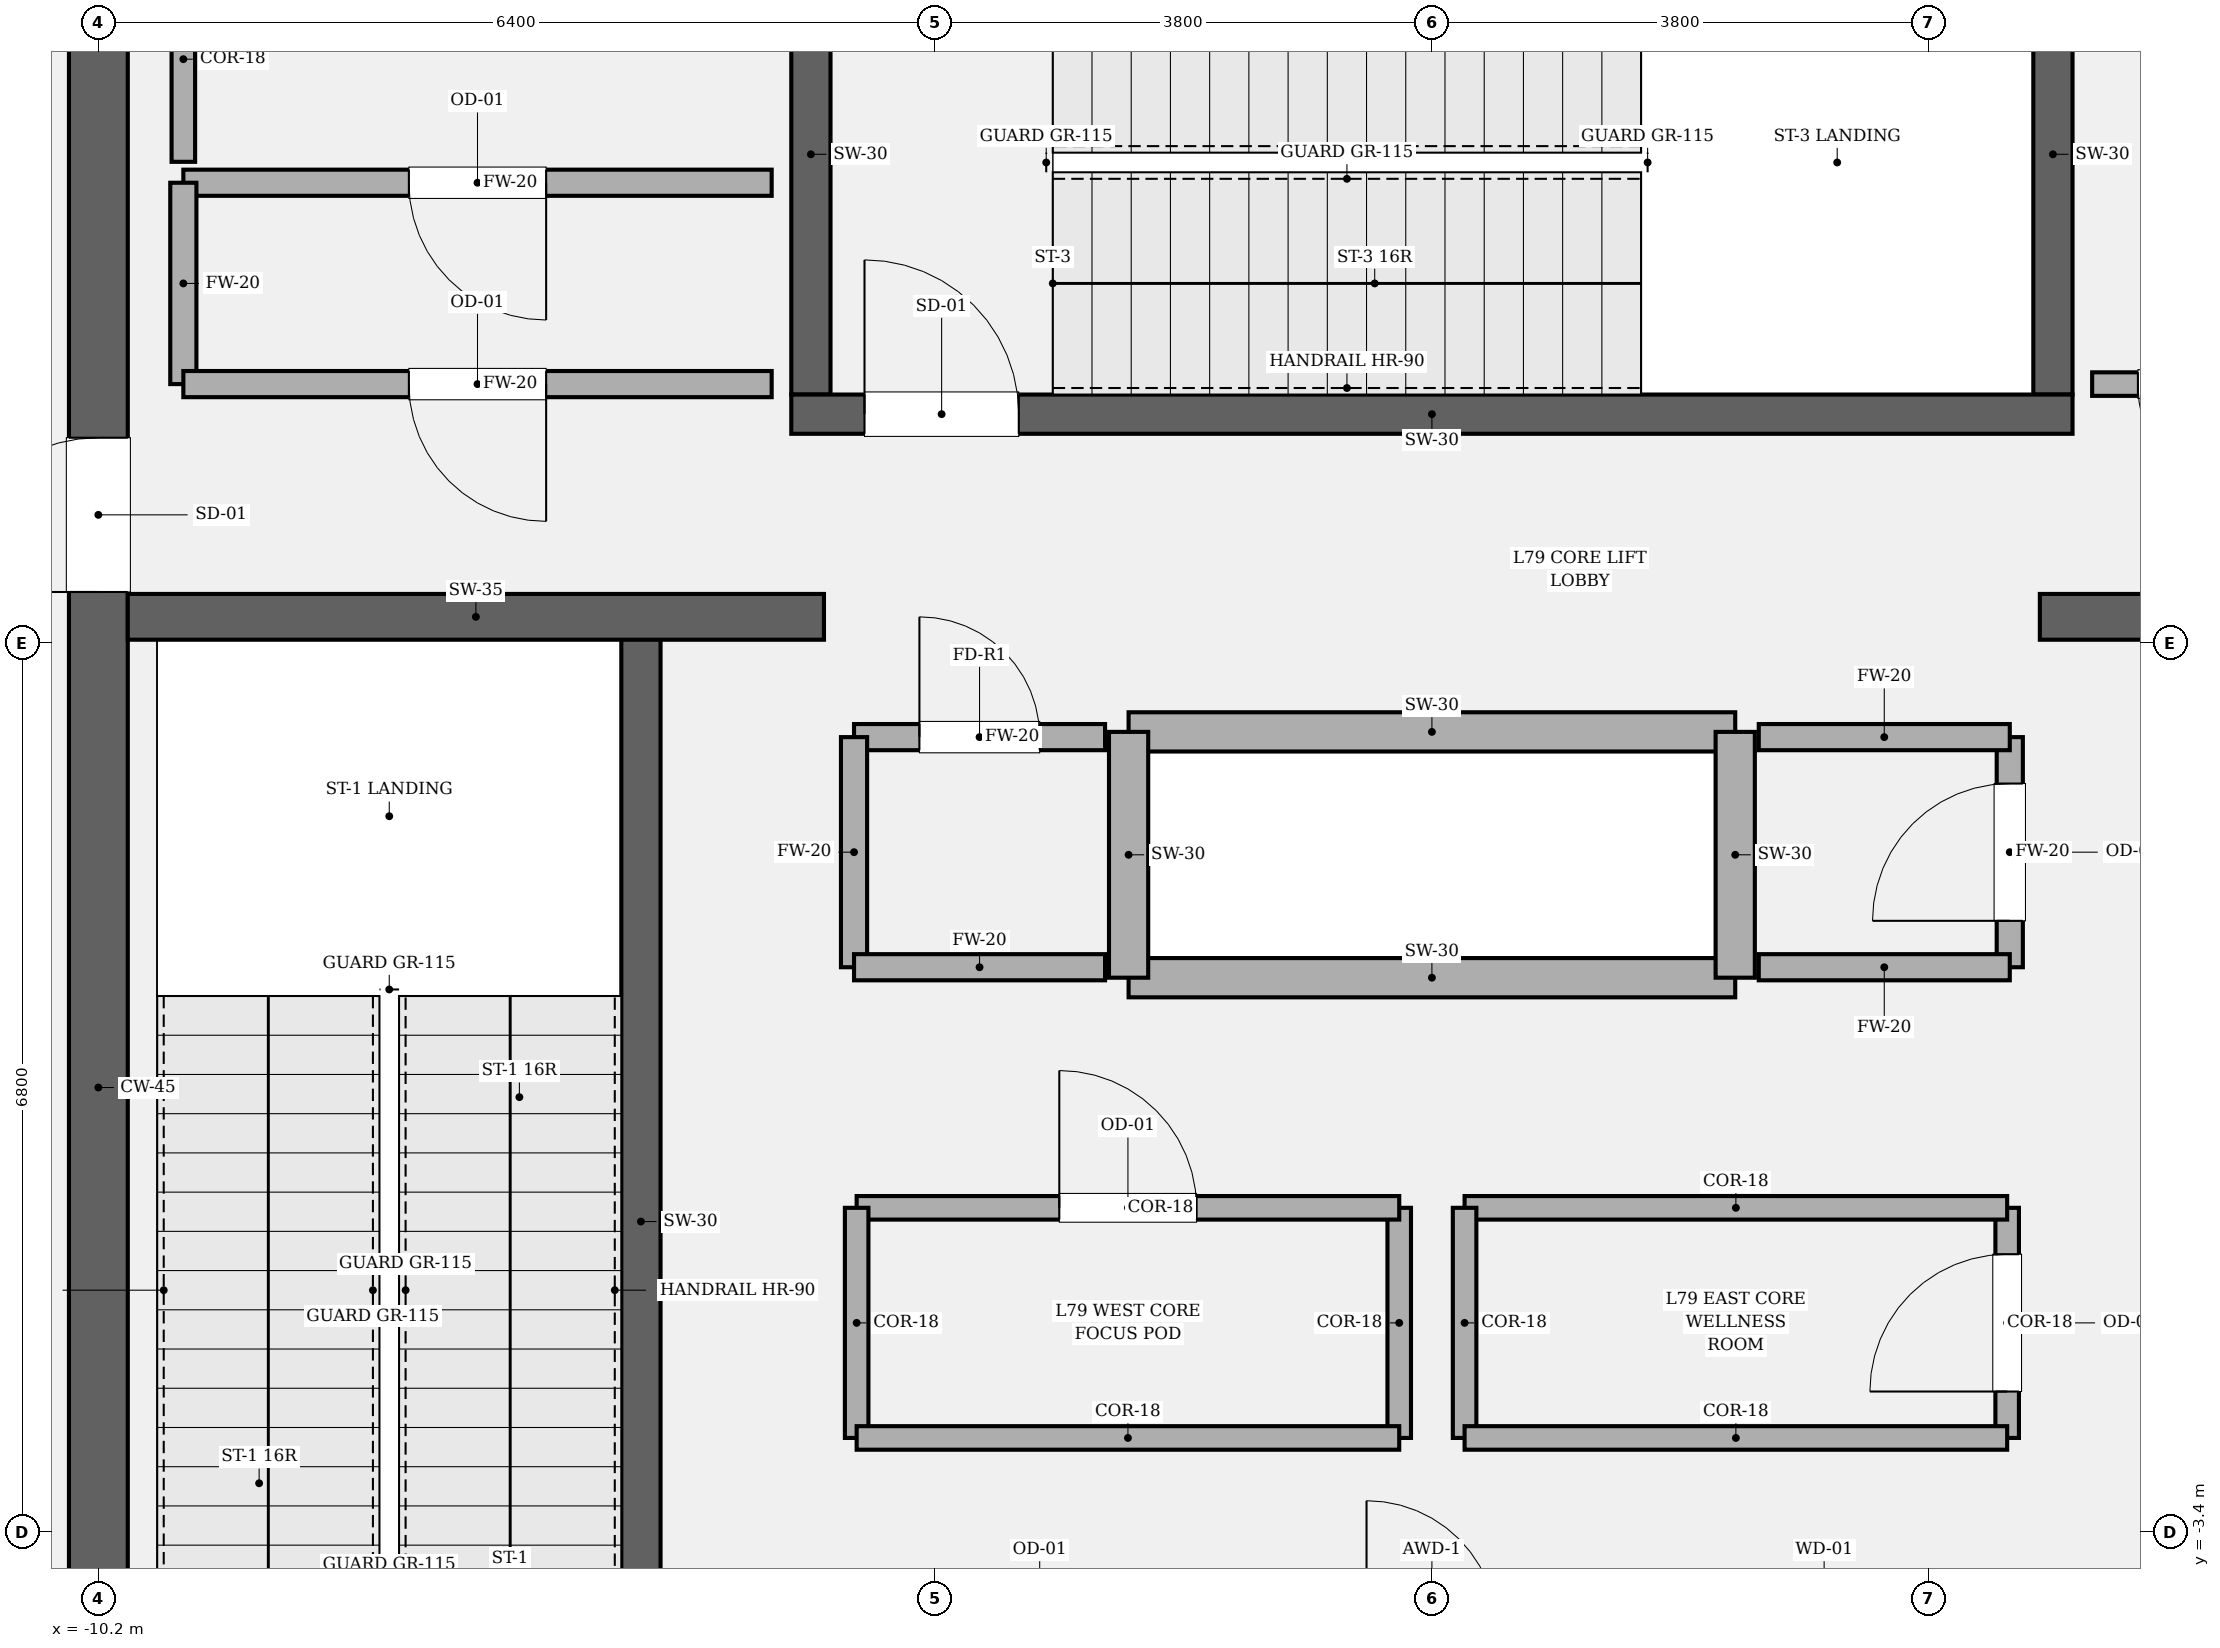
"""IFC4 building model, lengths in metres.
Left out: names, types, materials, properties, quantities, classifications, styles, units other than length and angle.
Written with IfcOpenShell. Run it as: python <this file> out.ifc"""

import sys

from ifc_helpers import new_model, si_unit, direction, frame, frame_2d, origin, place, context, subcontext, project, spatial, rectangle, extrude, element, fill, save


model = new_model("IFC4")
c1 = context("Model", 3, precision=1e-05, world=origin(), true_north=direction((0.0, 1.0)))
c2 = subcontext(c1, "Body", "Model", "MODEL_VIEW")
j1 = project(units=[si_unit("LENGTHUNIT", "METRE"), si_unit("PLANEANGLEUNIT", "RADIAN")], contexts=[c1])
p1 = place(None, origin())
s1 = spatial("IfcSite", under=j1, at=p1, CompositionType="ELEMENT")
p2 = place(p1, origin())
s2 = spatial("IfcBuilding", under=s1, at=p2, CompositionType="ELEMENT")
p3 = place(p2, frame((0.0, 0.0, 334.2)))
s3 = spatial("IfcBuildingStorey", under=s2, at=p3, CompositionType="ELEMENT", Elevation=334.2)
p4 = place(p3, frame((-10.2, -8.975, 0.0), z_axis=(0.0, 0.0, 1.0), x_axis=(0.0, 1.0, 0.0)))
e1 = element("IfcWall", 1, at=p4, inside=s3, PredefinedType="SHEAR", context=c2, shape_type="SweptSolid", body=[
    extrude(rectangle(XDim=17.95, YDim=0.45, at=frame_2d((8.975, 0.0))), origin(), (0.0, 0.0, 1.0), 4.8),
])
p5 = place(p4, frame((12.765, 0.0, 0.0)))
e2 = element("IfcOpeningElement", 2, at=p5, cuts=e1, PredefinedType="OPENING", context=c2, shape_type="SweptSolid", body=[
    extrude(rectangle(XDim=1.18, YDim=2.2, at=frame_2d((0.59, 1.1))), frame((0.0, 0.235, 0.0), z_axis=(0.0, -1.0, 0.0), x_axis=(1.0, 0.0, 0.0)), (0.0, 0.0, 1.0), 0.47),
])
p6 = place(p3, frame((-6.05, -5.5, 0.0), z_axis=(0.0, 0.0, 1.0), x_axis=(0.0, 1.0, 0.0)))
e3 = element("IfcWall", 3, at=p6, inside=s3, PredefinedType="SOLIDWALL", context=c2, shape_type="SweptSolid", body=[
    extrude(rectangle(XDim=8.95, YDim=0.3, at=frame_2d((4.475, 0.0))), origin(), (0.0, 0.0, 1.0), 4.8),
])
for number, where, z_axis, x_axis in (
    (4, (-4.75, 5.3, 0.0), (0.0, 0.0, 1.0), (0.0, 1.0, 0.0)),
    (5, (4.75, 8.975, 0.0), (0.0, 0.0, 1.0), (0.0, -1.0, 0.0)),
):
    element("IfcWall", number, at=place(p3, frame(where, z_axis=z_axis, x_axis=x_axis)), inside=s3, PredefinedType="SOLIDWALL", context=c2, shape_type="SweptSolid", body=[
        extrude(rectangle(XDim=3.675, YDim=0.3, at=frame_2d((1.837, 0.0))), origin(), (0.0, 0.0, 1.0), 4.8),
    ])
p7 = place(p3, frame((-4.9, 5.15, 0.0), z_axis=(0.0, 0.0, 1.0), x_axis=(1.0, 0.0, 0.0)))
e6 = element("IfcWall", 6, at=p7, inside=s3, PredefinedType="SOLIDWALL", context=c2, shape_type="SweptSolid", body=[
    extrude(rectangle(XDim=9.8, YDim=0.3, at=frame_2d((4.9, 0.0))), origin(), (0.0, 0.0, 1.0), 4.8),
])
p8 = place(p7, frame((0.56, 0.0, 0.0)))
e7 = element("IfcOpeningElement", 7, at=p8, cuts=e6, PredefinedType="OPENING", context=c2, shape_type="SweptSolid", body=[
    extrude(rectangle(XDim=1.18, YDim=2.2, at=frame_2d((0.59, 1.1))), frame((0.0, 0.16, 0.0), z_axis=(0.0, -1.0, 0.0), x_axis=(1.0, 0.0, 0.0)), (0.0, 0.0, 1.0), 0.32),
])
for number, where, z_axis, x_axis in (
    (8, (-9.975, 3.6, 0.0), (0.0, 0.0, 1.0), (1.0, 0.0, 0.0)),
    (9, (4.65, 3.6, 0.0), (0.0, 0.0, 1.0), (1.0, 0.0, 0.0)),
):
    element("IfcWall", number, at=place(p3, frame(where, z_axis=z_axis, x_axis=x_axis)), inside=s3, PredefinedType="SOLIDWALL", context=c2, shape_type="SweptSolid", body=[
        extrude(rectangle(XDim=5.325, YDim=0.35, at=frame_2d((2.663, 0.0))), origin(), (0.0, 0.0, 1.0), 4.8),
    ])
for number, where, z_axis, x_axis in (
    (10, (-2.32, 0.84, 0.0), (0.0, 0.0, 1.0), (1.0, 0.0, 0.0)),
    (11, (-2.32, 2.72, 0.0), (0.0, 0.0, 1.0), (1.0, 0.0, 0.0)),
):
    element("IfcWall", number, at=place(p3, frame(where, z_axis=z_axis, x_axis=x_axis)), inside=s3, PredefinedType="SOLIDWALL", context=c2, shape_type="SweptSolid", body=[
        extrude(rectangle(XDim=4.64, YDim=0.3, at=frame_2d((2.32, 0.0))), origin(), (0.0, 0.0, 1.0), 4.54),
    ])
for number, where, z_axis, x_axis in (
    (12, (-2.32, 0.84, 0.0), (0.0, 0.0, 1.0), (0.0, 1.0, 0.0)),
    (13, (2.32, 0.84, 0.0), (0.0, 0.0, 1.0), (0.0, 1.0, 0.0)),
):
    element("IfcWall", number, at=place(p3, frame(where, z_axis=z_axis, x_axis=x_axis)), inside=s3, PredefinedType="SOLIDWALL", context=c2, shape_type="SweptSolid", body=[
        extrude(rectangle(XDim=1.88, YDim=0.3, at=frame_2d((0.94, 0.0))), origin(), (0.0, 0.0, 1.0), 4.54),
    ])
p9 = place(p3, frame((-0.25, -2.68, 0.0), z_axis=(0.0, 0.0, 1.0), x_axis=(0.0, 1.0, 0.0)))
e14 = element("IfcWall", 14, at=p9, inside=s3, PredefinedType="PARTITIONING", context=c2, shape_type="SweptSolid", body=[
    extrude(rectangle(XDim=1.76, YDim=0.18, at=frame_2d((0.88, 0.0))), origin(), (0.0, 0.0, 1.0), 4.54),
])
p10 = place(p3, frame((-0.25, -0.92, 0.0), z_axis=(0.0, 0.0, 1.0), x_axis=(-1.0, 0.0, 0.0)))
e15 = element("IfcWall", 15, at=p10, inside=s3, PredefinedType="PARTITIONING", context=c2, shape_type="SweptSolid", body=[
    extrude(rectangle(XDim=4.15, YDim=0.18, at=frame_2d((2.075, 0.0))), origin(), (0.0, 0.0, 1.0), 4.54),
])
p11 = place(p10, frame((1.55, 0.0, 0.0)))
e16 = element("IfcOpeningElement", 16, at=p11, cuts=e15, PredefinedType="OPENING", context=c2, shape_type="SweptSolid", body=[
    extrude(rectangle(XDim=1.05, YDim=2.2, at=frame_2d((0.525, 1.1))), frame((0.0, 0.1, 0.0), z_axis=(0.0, -1.0, 0.0), x_axis=(1.0, 0.0, 0.0)), (0.0, 0.0, 1.0), 0.2),
])
p12 = place(p3, frame((-4.4, -0.92, 0.0), z_axis=(0.0, 0.0, 1.0), x_axis=(0.0, -1.0, 0.0)))
e17 = element("IfcWall", 17, at=p12, inside=s3, PredefinedType="PARTITIONING", context=c2, shape_type="SweptSolid", body=[
    extrude(rectangle(XDim=1.76, YDim=0.18, at=frame_2d((0.88, 0.0))), origin(), (0.0, 0.0, 1.0), 4.54),
])
p13 = place(p3, frame((-4.4, -2.68, 0.0), z_axis=(0.0, 0.0, 1.0), x_axis=(1.0, 0.0, 0.0)))
e18 = element("IfcWall", 18, at=p13, inside=s3, PredefinedType="PARTITIONING", context=c2, shape_type="SweptSolid", body=[
    extrude(rectangle(XDim=4.15, YDim=0.18, at=frame_2d((2.075, 0.0))), origin(), (0.0, 0.0, 1.0), 4.54),
])
p14 = place(p3, frame((4.4, -2.68, 0.0), z_axis=(0.0, 0.0, 1.0), x_axis=(0.0, 1.0, 0.0)))
e19 = element("IfcWall", 19, at=p14, inside=s3, PredefinedType="PARTITIONING", context=c2, shape_type="SweptSolid", body=[
    extrude(rectangle(XDim=1.76, YDim=0.18, at=frame_2d((0.88, 0.0))), origin(), (0.0, 0.0, 1.0), 4.54),
])
p15 = place(p14, frame((0.355, 0.0, 0.0)))
e20 = element("IfcOpeningElement", 20, at=p15, cuts=e19, PredefinedType="OPENING", context=c2, shape_type="SweptSolid", body=[
    extrude(rectangle(XDim=1.05, YDim=2.2, at=frame_2d((0.525, 1.1))), frame((0.0, 0.1, 0.0), z_axis=(0.0, -1.0, 0.0), x_axis=(1.0, 0.0, 0.0)), (0.0, 0.0, 1.0), 0.2),
])
p16 = place(p3, frame((4.4, -0.92, 0.0), z_axis=(0.0, 0.0, 1.0), x_axis=(-1.0, 0.0, 0.0)))
e21 = element("IfcWall", 21, at=p16, inside=s3, PredefinedType="PARTITIONING", context=c2, shape_type="SweptSolid", body=[
    extrude(rectangle(XDim=4.15, YDim=0.18, at=frame_2d((2.075, 0.0))), origin(), (0.0, 0.0, 1.0), 4.54),
])
p17 = place(p3, frame((0.25, -0.92, 0.0), z_axis=(0.0, 0.0, 1.0), x_axis=(0.0, -1.0, 0.0)))
e22 = element("IfcWall", 22, at=p17, inside=s3, PredefinedType="PARTITIONING", context=c2, shape_type="SweptSolid", body=[
    extrude(rectangle(XDim=1.76, YDim=0.18, at=frame_2d((0.88, 0.0))), origin(), (0.0, 0.0, 1.0), 4.54),
])
p18 = place(p3, frame((0.25, -2.68, 0.0), z_axis=(0.0, 0.0, 1.0), x_axis=(1.0, 0.0, 0.0)))
e23 = element("IfcWall", 23, at=p18, inside=s3, PredefinedType="PARTITIONING", context=c2, shape_type="SweptSolid", body=[
    extrude(rectangle(XDim=4.15, YDim=0.18, at=frame_2d((2.075, 0.0))), origin(), (0.0, 0.0, 1.0), 4.54),
])
p19 = place(p3, frame((-2.5, 2.68, 0.0), z_axis=(0.0, 0.0, 1.0), x_axis=(-1.0, 0.0, 0.0)))
e24 = element("IfcWall", 24, at=p19, inside=s3, PredefinedType="SOLIDWALL", context=c2, shape_type="SweptSolid", body=[
    extrude(rectangle(XDim=1.92, YDim=0.2, at=frame_2d((0.96, 0.0))), origin(), (0.0, 0.0, 1.0), 4.54),
])
p20 = place(p19, frame((0.5, 0.0, 0.0)))
e25 = element("IfcOpeningElement", 25, at=p20, cuts=e24, PredefinedType="OPENING", context=c2, shape_type="SweptSolid", body=[
    extrude(rectangle(XDim=0.92, YDim=2.1, at=frame_2d((0.46, 1.05))), frame((0.0, 0.11, 0.0), z_axis=(0.0, -1.0, 0.0), x_axis=(1.0, 0.0, 0.0)), (0.0, 0.0, 1.0), 0.22),
])
p21 = place(p3, frame((-4.42, 2.68, 0.0), z_axis=(0.0, 0.0, 1.0), x_axis=(0.0, -1.0, 0.0)))
e26 = element("IfcWall", 26, at=p21, inside=s3, PredefinedType="SOLIDWALL", context=c2, shape_type="SweptSolid", body=[
    extrude(rectangle(XDim=1.76, YDim=0.2, at=frame_2d((0.88, 0.0))), origin(), (0.0, 0.0, 1.0), 4.54),
])
p22 = place(p3, frame((-4.42, 0.92, 0.0), z_axis=(0.0, 0.0, 1.0), x_axis=(1.0, 0.0, 0.0)))
e27 = element("IfcWall", 27, at=p22, inside=s3, PredefinedType="SOLIDWALL", context=c2, shape_type="SweptSolid", body=[
    extrude(rectangle(XDim=1.92, YDim=0.2, at=frame_2d((0.96, 0.0))), origin(), (0.0, 0.0, 1.0), 4.54),
])
p23 = place(p3, frame((4.42, 0.92, 0.0), z_axis=(0.0, 0.0, 1.0), x_axis=(0.0, 1.0, 0.0)))
e28 = element("IfcWall", 28, at=p23, inside=s3, PredefinedType="SOLIDWALL", context=c2, shape_type="SweptSolid", body=[
    extrude(rectangle(XDim=1.76, YDim=0.2, at=frame_2d((0.88, 0.0))), origin(), (0.0, 0.0, 1.0), 4.54),
])
p24 = place(p23, frame((0.355, 0.0, 0.0)))
e29 = element("IfcOpeningElement", 29, at=p24, cuts=e28, PredefinedType="OPENING", context=c2, shape_type="SweptSolid", body=[
    extrude(rectangle(XDim=1.05, YDim=2.2, at=frame_2d((0.525, 1.1))), frame((0.0, 0.11, 0.0), z_axis=(0.0, -1.0, 0.0), x_axis=(1.0, 0.0, 0.0)), (0.0, 0.0, 1.0), 0.22),
])
for number, where, z_axis, x_axis in (
    (30, (4.42, 2.68, 0.0), (0.0, 0.0, 1.0), (-1.0, 0.0, 0.0)),
    (31, (2.5, 0.92, 0.0), (0.0, 0.0, 1.0), (1.0, 0.0, 0.0)),
):
    element("IfcWall", number, at=place(p3, frame(where, z_axis=z_axis, x_axis=x_axis)), inside=s3, PredefinedType="SOLIDWALL", context=c2, shape_type="SweptSolid", body=[
        extrude(rectangle(XDim=1.92, YDim=0.2, at=frame_2d((0.96, 0.0))), origin(), (0.0, 0.0, 1.0), 4.54),
    ])
p25 = place(p3, frame((-5.05, 6.92, 0.0), z_axis=(0.0, 0.0, 1.0), x_axis=(-1.0, 0.0, 0.0)))
e32 = element("IfcWall", 32, at=p25, inside=s3, PredefinedType="SOLIDWALL", context=c2, shape_type="SweptSolid", body=[
    extrude(rectangle(XDim=4.5, YDim=0.2, at=frame_2d((2.25, 0.0))), origin(), (0.0, 0.0, 1.0), 4.54),
])
p26 = place(p25, frame((1.725, 0.0, 0.0)))
e33 = element("IfcOpeningElement", 33, at=p26, cuts=e32, PredefinedType="OPENING", context=c2, shape_type="SweptSolid", body=[
    extrude(rectangle(XDim=1.05, YDim=2.2, at=frame_2d((0.525, 1.1))), frame((0.0, 0.11, 0.0), z_axis=(0.0, -1.0, 0.0), x_axis=(1.0, 0.0, 0.0)), (0.0, 0.0, 1.0), 0.22),
])
p27 = place(p3, frame((-9.55, 6.92, 0.0), z_axis=(0.0, 0.0, 1.0), x_axis=(0.0, -1.0, 0.0)))
e34 = element("IfcWall", 34, at=p27, inside=s3, PredefinedType="SOLIDWALL", context=c2, shape_type="SweptSolid", body=[
    extrude(rectangle(XDim=1.54, YDim=0.2, at=frame_2d((0.77, 0.0))), origin(), (0.0, 0.0, 1.0), 4.54),
])
p28 = place(p3, frame((-9.55, 5.38, 0.0), z_axis=(0.0, 0.0, 1.0), x_axis=(1.0, 0.0, 0.0)))
e35 = element("IfcWall", 35, at=p28, inside=s3, PredefinedType="SOLIDWALL", context=c2, shape_type="SweptSolid", body=[
    extrude(rectangle(XDim=4.5, YDim=0.2, at=frame_2d((2.25, 0.0))), origin(), (0.0, 0.0, 1.0), 4.54),
])
p29 = place(p28, frame((1.725, 0.0, 0.0)))
e36 = element("IfcOpeningElement", 36, at=p29, cuts=e35, PredefinedType="OPENING", context=c2, shape_type="SweptSolid", body=[
    extrude(rectangle(XDim=1.05, YDim=2.2, at=frame_2d((0.525, 1.1))), frame((0.0, 0.11, 0.0), z_axis=(0.0, -1.0, 0.0), x_axis=(1.0, 0.0, 0.0)), (0.0, 0.0, 1.0), 0.22),
])
p30 = place(p3, frame((-9.55, 8.65, 0.0), z_axis=(0.0, 0.0, 1.0), x_axis=(0.0, -1.0, 0.0)))
e37 = element("IfcWall", 37, at=p30, inside=s3, PredefinedType="PARTITIONING", context=c2, shape_type="SweptSolid", body=[
    extrude(rectangle(XDim=1.57, YDim=0.18, at=frame_2d((0.785, 0.0))), origin(), (0.0, 0.0, 1.0), 4.54),
])
p31 = place(p3, frame((5.05, 5.38, 0.0), z_axis=(0.0, 0.0, 1.0), x_axis=(1.0, 0.0, 0.0)))
e38 = element("IfcWall", 38, at=p31, inside=s3, PredefinedType="PARTITIONING", context=c2, shape_type="SweptSolid", body=[
    extrude(rectangle(XDim=1.75, YDim=0.18, at=frame_2d((0.875, 0.0))), origin(), (0.0, 0.0, 1.0), 4.54),
])
p32 = place(p31, frame((0.35, 0.0, 0.0)))
e39 = element("IfcOpeningElement", 39, at=p32, cuts=e38, PredefinedType="OPENING", context=c2, shape_type="SweptSolid", body=[
    extrude(rectangle(XDim=1.05, YDim=2.2, at=frame_2d((0.525, 1.1))), frame((0.0, 0.1, 0.0), z_axis=(0.0, -1.0, 0.0), x_axis=(1.0, 0.0, 0.0)), (0.0, 0.0, 1.0), 0.2),
])
p33 = place(p8, origin())
e40 = element("IfcDoor", 40, at=p33, inside=s3, OperationType="SINGLE_SWING_LEFT", PredefinedType="DOOR", context=c2, shape_type="SweptSolid", body=[
    extrude(rectangle(XDim=1.18, YDim=2.2, at=frame_2d((0.59, 1.1))), frame((0.0, 0.025, 0.0), z_axis=(0.0, -1.0, 0.0), x_axis=(1.0, 0.0, 0.0)), (0.0, 0.0, 1.0), 0.05),
])
fill(e7, e40)
p34 = place(p5, origin())
e41 = element("IfcDoor", 41, at=p34, inside=s3, OperationType="SINGLE_SWING_LEFT", PredefinedType="DOOR", context=c2, shape_type="SweptSolid", body=[
    extrude(rectangle(XDim=1.18, YDim=2.2, at=frame_2d((0.59, 1.1))), frame((0.0, 0.025, 0.0), z_axis=(0.0, -1.0, 0.0), x_axis=(1.0, 0.0, 0.0)), (0.0, 0.0, 1.0), 0.05),
])
fill(e2, e41)
p35 = place(p11, origin())
e42 = element("IfcDoor", 42, at=p35, inside=s3, OperationType="SINGLE_SWING_RIGHT", PredefinedType="DOOR", context=c2, shape_type="SweptSolid", body=[
    extrude(rectangle(XDim=1.05, YDim=2.2, at=frame_2d((0.525, 1.1))), frame((0.0, 0.025, 0.0), z_axis=(0.0, -1.0, 0.0), x_axis=(1.0, 0.0, 0.0)), (0.0, 0.0, 1.0), 0.05),
])
fill(e16, e42)
p36 = place(p15, origin())
e43 = element("IfcDoor", 43, at=p36, inside=s3, OperationType="SINGLE_SWING_LEFT", PredefinedType="DOOR", context=c2, shape_type="SweptSolid", body=[
    extrude(rectangle(XDim=1.05, YDim=2.2, at=frame_2d((0.525, 1.1))), frame((0.0, 0.025, 0.0), z_axis=(0.0, -1.0, 0.0), x_axis=(1.0, 0.0, 0.0)), (0.0, 0.0, 1.0), 0.05),
])
fill(e20, e43)
p37 = place(p20, origin())
e44 = element("IfcDoor", 44, at=p37, inside=s3, OperationType="SINGLE_SWING_RIGHT", PredefinedType="DOOR", context=c2, shape_type="SweptSolid", body=[
    extrude(rectangle(XDim=0.92, YDim=2.1, at=frame_2d((0.46, 1.05))), frame((0.0, 0.025, 0.0), z_axis=(0.0, -1.0, 0.0), x_axis=(1.0, 0.0, 0.0)), (0.0, 0.0, 1.0), 0.05),
])
fill(e25, e44)
p38 = place(p24, origin())
e45 = element("IfcDoor", 45, at=p38, inside=s3, OperationType="SINGLE_SWING_LEFT", PredefinedType="DOOR", context=c2, shape_type="SweptSolid", body=[
    extrude(rectangle(XDim=1.05, YDim=2.2, at=frame_2d((0.525, 1.1))), frame((0.0, 0.025, 0.0), z_axis=(0.0, -1.0, 0.0), x_axis=(1.0, 0.0, 0.0)), (0.0, 0.0, 1.0), 0.05),
])
fill(e29, e45)
p39 = place(p29, origin())
e46 = element("IfcDoor", 46, at=p39, inside=s3, OperationType="SINGLE_SWING_RIGHT", PredefinedType="DOOR", context=c2, shape_type="SweptSolid", body=[
    extrude(rectangle(XDim=1.05, YDim=2.2, at=frame_2d((0.525, 1.1))), frame((0.0, 0.025, 0.0), z_axis=(0.0, -1.0, 0.0), x_axis=(1.0, 0.0, 0.0)), (0.0, 0.0, 1.0), 0.05),
])
fill(e36, e46)
p40 = place(p26, origin())
e47 = element("IfcDoor", 47, at=p40, inside=s3, OperationType="SINGLE_SWING_LEFT", PredefinedType="DOOR", context=c2, shape_type="SweptSolid", body=[
    extrude(rectangle(XDim=1.05, YDim=2.2, at=frame_2d((0.525, 1.1))), frame((0.0, 0.025, 0.0), z_axis=(0.0, -1.0, 0.0), x_axis=(1.0, 0.0, 0.0)), (0.0, 0.0, 1.0), 0.05),
])
fill(e33, e47)
p41 = place(p32, origin())
e48 = element("IfcDoor", 48, at=p41, inside=s3, OperationType="SINGLE_SWING_RIGHT", PredefinedType="DOOR", context=c2, shape_type="SweptSolid", body=[
    extrude(rectangle(XDim=1.05, YDim=2.2, at=frame_2d((0.525, 1.1))), frame((0.0, 0.025, 0.0), z_axis=(0.0, -1.0, 0.0), x_axis=(1.0, 0.0, 0.0)), (0.0, 0.0, 1.0), 0.05),
])
fill(e39, e48)
save(model, sys.argv[1])
